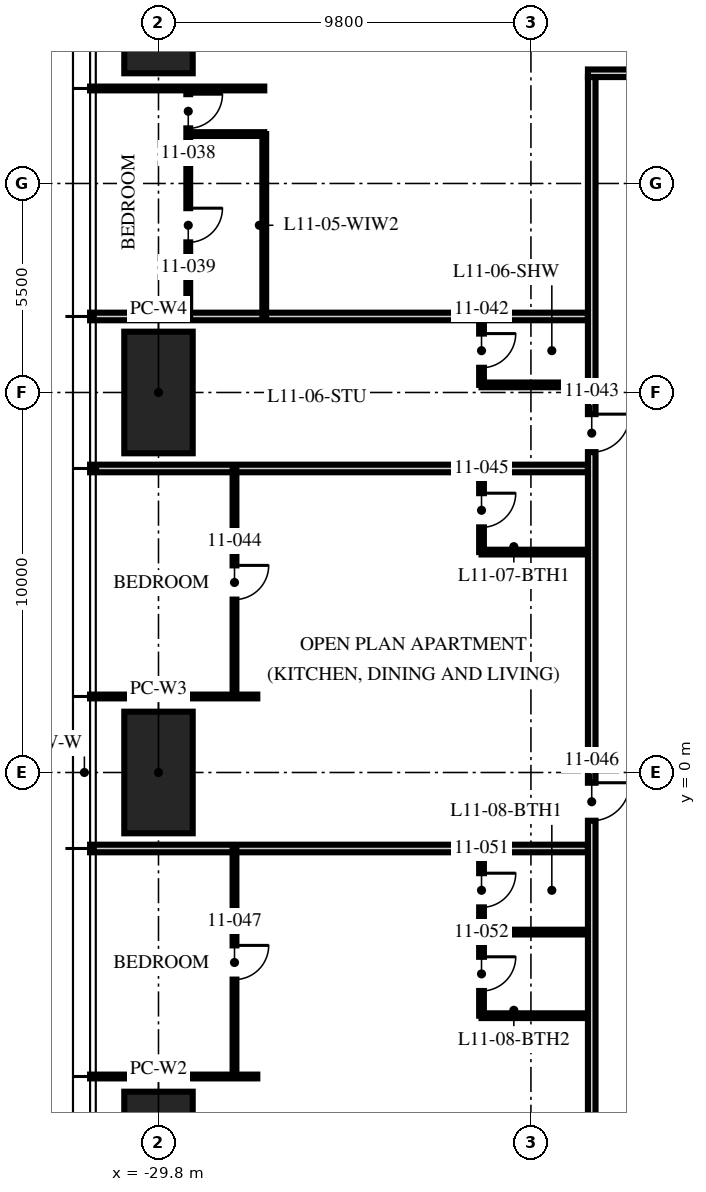
"""IFC4 building model, lengths in metres.
Left out: names, types, materials, properties, quantities, classifications, styles, units other than length and angle.
Written with IfcOpenShell. Run it as: python <this file> out.ifc"""

import sys

from ifc_helpers import new_model, si_unit, direction, frame, frame_2d, origin, origin_2d, place, context, subcontext, project, spatial, rectangle, hollow_rectangle, extrude, element, fill, save


model = new_model("IFC4")
c1 = context("Model", 3, precision=1e-05, world=origin(), true_north=direction((0.0, 1.0)))
c2 = subcontext(c1, "Body", "Model", "MODEL_VIEW")
j1 = project(units=[si_unit("LENGTHUNIT", "METRE"), si_unit("PLANEANGLEUNIT", "RADIAN")], contexts=[c1])
p1 = place(None, origin())
s1 = spatial("IfcSite", under=j1, at=p1, CompositionType="ELEMENT")
p2 = place(p1, origin())
s2 = spatial("IfcBuilding", under=s1, at=p2, CompositionType="ELEMENT")
p3 = place(p2, frame((0.0, 0.0, 47.25)))
s3 = spatial("IfcBuildingStorey", under=s2, at=p3, CompositionType="ELEMENT", Elevation=47.25)
for number, where, z_axis, x_axis in (
    (1, (-29.8, -10.0, 0.0), (0.0, 0.0, 1.0), (0.0, 1.0, 0.0)),
    (2, (-29.8, 0.0, 0.0), (0.0, 0.0, 1.0), (0.0, 1.0, 0.0)),
    (3, (-29.8, 10.0, 0.0), (0.0, 0.0, 1.0), (0.0, 1.0, 0.0)),
    (4, (-29.8, 20.0, 0.0), (0.0, 0.0, 1.0), (0.0, 1.0, 0.0)),
):
    element("IfcColumn", number, at=place(p3, frame(where, z_axis=z_axis, x_axis=x_axis)), inside=s3, PredefinedType="COLUMN", context=c2, shape_type="SweptSolid", body=[
        extrude(hollow_rectangle(XDim=3.2, YDim=1.8, WallThickness=0.2, at=origin_2d()), origin(), (0.0, 0.0, 1.0), 3.75),
    ])
p4 = place(p3, frame((-27.017, 18.0, 0.0), z_axis=(0.0, 0.0, 1.0), x_axis=(-1.0, 0.0, 0.0)))
e5 = element("IfcWall", 5, at=p4, inside=s3, PredefinedType="PARTITIONING", context=c2, shape_type="SweptSolid", body=[
    extrude(rectangle(XDim=4.583, YDim=0.1, at=frame_2d((2.292, 0.0))), origin(), (0.0, 0.0, 1.0), 2.71),
])
for number, where, z_axis, x_axis in (
    (6, (-18.5, 12.0, 0.0), (0.0, 0.0, 1.0), (-1.0, 0.0, 0.0)),
    (7, (-18.5, 8.0, 0.0), (0.0, 0.0, 1.0), (-1.0, 0.0, 0.0)),
):
    element("IfcWall", number, at=place(p3, frame(where, z_axis=z_axis, x_axis=x_axis)), inside=s3, PredefinedType="PARTITIONING", context=c2, shape_type="SweptSolid", body=[
        extrude(rectangle(XDim=13.1, YDim=0.2, at=frame_2d((6.55, 0.0))), origin(), (0.0, 0.0, 1.0), 2.71),
    ])
p5 = place(p3, frame((-27.2, 2.0, 0.0), z_axis=(0.0, 0.0, 1.0), x_axis=(-1.0, 0.0, 0.0)))
e8 = element("IfcWall", 8, at=p5, inside=s3, PredefinedType="PARTITIONING", context=c2, shape_type="SweptSolid", body=[
    extrude(rectangle(XDim=4.4, YDim=0.1, at=frame_2d((2.2, 0.0))), origin(), (0.0, 0.0, 1.0), 2.71),
])
p6 = place(p3, frame((-18.5, -2.0, 0.0), z_axis=(0.0, 0.0, 1.0), x_axis=(-1.0, 0.0, 0.0)))
e9 = element("IfcWall", 9, at=p6, inside=s3, PredefinedType="PARTITIONING", context=c2, shape_type="SweptSolid", body=[
    extrude(rectangle(XDim=13.1, YDim=0.2, at=frame_2d((6.55, 0.0))), origin(), (0.0, 0.0, 1.0), 2.71),
])
p7 = place(p3, frame((-27.2, -8.0, 0.0), z_axis=(0.0, 0.0, 1.0), x_axis=(-1.0, 0.0, 0.0)))
e10 = element("IfcWall", 10, at=p7, inside=s3, PredefinedType="PARTITIONING", context=c2, shape_type="SweptSolid", body=[
    extrude(rectangle(XDim=4.4, YDim=0.1, at=frame_2d((2.2, 0.0))), origin(), (0.0, 0.0, 1.0), 2.71),
])
p8 = place(p3, frame((-29.017, 18.0, 0.0), z_axis=(0.0, 0.0, 1.0), x_axis=(0.0, -1.0, 0.0)))
e11 = element("IfcWall", 11, at=p8, inside=s3, PredefinedType="PARTITIONING", context=c2, shape_type="SweptSolid", body=[
    extrude(rectangle(XDim=6.0, YDim=0.1, at=frame_2d((3.0, 0.0))), origin(), (0.0, 0.0, 1.0), 2.61),
])
p9 = place(p8, frame((0.15, 0.0, 0.0)))
e12 = element("IfcOpeningElement", 12, at=p9, cuts=e11, PredefinedType="OPENING", context=c2, shape_type="SweptSolid", body=[
    extrude(rectangle(XDim=0.9, YDim=2.1, at=frame_2d((0.45, 1.05))), frame((0.0, 0.06, 0.0), z_axis=(0.0, -1.0, 0.0), x_axis=(1.0, 0.0, 0.0)), (0.0, 0.0, 1.0), 0.12),
])
p10 = place(p8, frame((3.15, 0.0, 0.0)))
e13 = element("IfcOpeningElement", 13, at=p10, cuts=e11, PredefinedType="OPENING", context=c2, shape_type="SweptSolid", body=[
    extrude(rectangle(XDim=0.9, YDim=2.1, at=frame_2d((0.45, 1.05))), frame((0.0, 0.06, 0.0), z_axis=(0.0, -1.0, 0.0), x_axis=(1.0, 0.0, 0.0)), (0.0, 0.0, 1.0), 0.12),
])
p11 = place(p3, frame((-27.017, 16.8, 0.0), z_axis=(0.0, 0.0, 1.0), x_axis=(-1.0, 0.0, 0.0)))
e14 = element("IfcWall", 14, at=p11, inside=s3, PredefinedType="PARTITIONING", context=c2, shape_type="SweptSolid", body=[
    extrude(rectangle(XDim=2.0, YDim=0.1, at=frame_2d((1.0, 0.0))), origin(), (0.0, 0.0, 1.0), 3.5),
])
p12 = place(p3, frame((-27.017, 16.8, 0.0), z_axis=(0.0, 0.0, 1.0), x_axis=(0.0, -1.0, 0.0)))
e15 = element("IfcWall", 15, at=p12, inside=s3, PredefinedType="PARTITIONING", context=c2, shape_type="SweptSolid", body=[
    extrude(rectangle(XDim=4.8, YDim=0.1, at=frame_2d((2.4, 0.0))), origin(), (0.0, 0.0, 1.0), 2.61),
])
p13 = place(p3, frame((-21.3, 12.0, 0.0), z_axis=(0.0, 0.0, 1.0), x_axis=(0.0, -1.0, 0.0)))
e16 = element("IfcWall", 16, at=p13, inside=s3, PredefinedType="PARTITIONING", context=c2, shape_type="SweptSolid", body=[
    extrude(rectangle(XDim=1.8, YDim=0.125, at=frame_2d((0.9, 0.0))), origin(), (0.0, 0.0, 1.0), 3.5),
])
p14 = place(p13, frame((0.45, 0.0, 0.0)))
e17 = element("IfcOpeningElement", 17, at=p14, cuts=e16, PredefinedType="OPENING", context=c2, shape_type="SweptSolid", body=[
    extrude(rectangle(XDim=0.9, YDim=2.1, at=frame_2d((0.45, 1.05))), frame((0.0, 0.073, 0.0), z_axis=(0.0, -1.0, 0.0), x_axis=(1.0, 0.0, 0.0)), (0.0, 0.0, 1.0), 0.145),
])
p15 = place(p3, frame((-18.5, 10.2, 0.0), z_axis=(0.0, 0.0, 1.0), x_axis=(-1.0, 0.0, 0.0)))
e18 = element("IfcWall", 18, at=p15, inside=s3, PredefinedType="PARTITIONING", context=c2, shape_type="SweptSolid", body=[
    extrude(rectangle(XDim=2.8, YDim=0.125, at=frame_2d((1.4, 0.0))), origin(), (0.0, 0.0, 1.0), 2.492),
])
p16 = place(p3, frame((-27.8, 8.0, 0.0), z_axis=(0.0, 0.0, 1.0), x_axis=(0.0, -1.0, 0.0)))
e19 = element("IfcWall", 19, at=p16, inside=s3, PredefinedType="PARTITIONING", context=c2, shape_type="SweptSolid", body=[
    extrude(rectangle(XDim=6.0, YDim=0.1, at=frame_2d((3.0, 0.0))), origin(), (0.0, 0.0, 1.0), 2.61),
])
p17 = place(p16, frame((2.55, 0.0, 0.0)))
e20 = element("IfcOpeningElement", 20, at=p17, cuts=e19, PredefinedType="OPENING", context=c2, shape_type="SweptSolid", body=[
    extrude(rectangle(XDim=0.9, YDim=2.1, at=frame_2d((0.45, 1.05))), frame((0.0, 0.06, 0.0), z_axis=(0.0, -1.0, 0.0), x_axis=(1.0, 0.0, 0.0)), (0.0, 0.0, 1.0), 0.12),
])
p18 = place(p3, frame((-21.3, 8.0, 0.0), z_axis=(0.0, 0.0, 1.0), x_axis=(0.0, -1.0, 0.0)))
e21 = element("IfcWall", 21, at=p18, inside=s3, PredefinedType="PARTITIONING", context=c2, shape_type="SweptSolid", body=[
    extrude(rectangle(XDim=2.2, YDim=0.125, at=frame_2d((1.1, 0.0))), origin(), (0.0, 0.0, 1.0), 3.5),
])
p19 = place(p18, frame((0.65, 0.0, 0.0)))
e22 = element("IfcOpeningElement", 22, at=p19, cuts=e21, PredefinedType="OPENING", context=c2, shape_type="SweptSolid", body=[
    extrude(rectangle(XDim=0.9, YDim=2.1, at=frame_2d((0.45, 1.05))), frame((0.0, 0.073, 0.0), z_axis=(0.0, -1.0, 0.0), x_axis=(1.0, 0.0, 0.0)), (0.0, 0.0, 1.0), 0.145),
])
p20 = place(p3, frame((-18.5, 5.8, 0.0), z_axis=(0.0, 0.0, 1.0), x_axis=(-1.0, 0.0, 0.0)))
e23 = element("IfcWall", 23, at=p20, inside=s3, PredefinedType="PARTITIONING", context=c2, shape_type="SweptSolid", body=[
    extrude(rectangle(XDim=2.8, YDim=0.125, at=frame_2d((1.4, 0.0))), origin(), (0.0, 0.0, 1.0), 3.5),
])
p21 = place(p3, frame((-27.8, -2.0, 0.0), z_axis=(0.0, 0.0, 1.0), x_axis=(0.0, -1.0, 0.0)))
e24 = element("IfcWall", 24, at=p21, inside=s3, PredefinedType="PARTITIONING", context=c2, shape_type="SweptSolid", body=[
    extrude(rectangle(XDim=6.0, YDim=0.1, at=frame_2d((3.0, 0.0))), origin(), (0.0, 0.0, 1.0), 2.61),
])
p22 = place(p21, frame((2.55, 0.0, 0.0)))
e25 = element("IfcOpeningElement", 25, at=p22, cuts=e24, PredefinedType="OPENING", context=c2, shape_type="SweptSolid", body=[
    extrude(rectangle(XDim=0.9, YDim=2.1, at=frame_2d((0.45, 1.05))), frame((0.0, 0.06, 0.0), z_axis=(0.0, -1.0, 0.0), x_axis=(1.0, 0.0, 0.0)), (0.0, 0.0, 1.0), 0.12),
])
p23 = place(p3, frame((-21.3, -2.0, 0.0), z_axis=(0.0, 0.0, 1.0), x_axis=(0.0, -1.0, 0.0)))
e26 = element("IfcWall", 26, at=p23, inside=s3, PredefinedType="PARTITIONING", context=c2, shape_type="SweptSolid", body=[
    extrude(rectangle(XDim=4.4, YDim=0.125, at=frame_2d((2.2, 0.0))), origin(), (0.0, 0.0, 1.0), 2.61),
])
p24 = place(p23, frame((0.65, 0.0, 0.0)))
e27 = element("IfcOpeningElement", 27, at=p24, cuts=e26, PredefinedType="OPENING", context=c2, shape_type="SweptSolid", body=[
    extrude(rectangle(XDim=0.9, YDim=2.1, at=frame_2d((0.45, 1.05))), frame((0.0, 0.073, 0.0), z_axis=(0.0, -1.0, 0.0), x_axis=(1.0, 0.0, 0.0)), (0.0, 0.0, 1.0), 0.145),
])
p25 = place(p23, frame((2.85, 0.0, 0.0)))
e28 = element("IfcOpeningElement", 28, at=p25, cuts=e26, PredefinedType="OPENING", context=c2, shape_type="SweptSolid", body=[
    extrude(rectangle(XDim=0.9, YDim=2.1, at=frame_2d((0.45, 1.05))), frame((0.0, 0.073, 0.0), z_axis=(0.0, -1.0, 0.0), x_axis=(1.0, 0.0, 0.0)), (0.0, 0.0, 1.0), 0.145),
])
for number, where, z_axis, x_axis in (
    (29, (-18.5, -4.2, 0.0), (0.0, 0.0, 1.0), (-1.0, 0.0, 0.0)),
    (30, (-18.5, -6.4, 0.0), (0.0, 0.0, 1.0), (-1.0, 0.0, 0.0)),
):
    element("IfcWall", number, at=place(p3, frame(where, z_axis=z_axis, x_axis=x_axis)), inside=s3, PredefinedType="PARTITIONING", context=c2, shape_type="SweptSolid", body=[
        extrude(rectangle(XDim=2.8, YDim=0.125, at=frame_2d((1.4, 0.0))), origin(), (0.0, 0.0, 1.0), 3.5),
    ])
p26 = place(p3, frame((-18.5, 18.4, 0.0), z_axis=(0.0, 0.0, 1.0), x_axis=(1.0, 0.0, 0.0)))
e31 = element("IfcWall", 31, at=p26, inside=s3, PredefinedType="PARTITIONING", context=c2, shape_type="SweptSolid", body=[
    extrude(rectangle(XDim=14.5, YDim=0.2, at=frame_2d((7.25, 0.0))), origin(), (0.0, 0.0, 1.0), 2.3),
])
p27 = place(p3, frame((-18.4, 18.3, 0.0), z_axis=(0.0, 0.0, 1.0), x_axis=(0.0, -1.0, 0.0)))
e32 = element("IfcWall", 32, at=p27, inside=s3, PredefinedType="PARTITIONING", context=c2, shape_type="SweptSolid", body=[
    extrude(rectangle(XDim=36.6, YDim=0.2, at=frame_2d((18.3, 0.0))), origin(), (0.0, 0.0, 1.0), 2.3),
])
p28 = place(p27, frame((8.87, 0.0, 0.0)))
e33 = element("IfcOpeningElement", 33, at=p28, cuts=e32, PredefinedType="OPENING", context=c2, shape_type="SweptSolid", body=[
    extrude(rectangle(XDim=1.0, YDim=2.2, at=frame_2d((0.5, 1.1))), frame((0.0, 0.11, 0.0), z_axis=(0.0, -1.0, 0.0), x_axis=(1.0, 0.0, 0.0)), (0.0, 0.0, 1.0), 0.22),
])
p29 = place(p27, frame((18.57, 0.0, 0.0)))
e34 = element("IfcOpeningElement", 34, at=p29, cuts=e32, PredefinedType="OPENING", context=c2, shape_type="SweptSolid", body=[
    extrude(rectangle(XDim=1.0, YDim=2.2, at=frame_2d((0.5, 1.1))), frame((0.0, 0.11, 0.0), z_axis=(0.0, -1.0, 0.0), x_axis=(1.0, 0.0, 0.0)), (0.0, 0.0, 1.0), 0.22),
])
p30 = place(p27, frame((34.82, 0.0, 0.0)))
e35 = element("IfcOpeningElement", 35, at=p30, cuts=e32, PredefinedType="OPENING", context=c2, shape_type="SweptSolid", body=[
    extrude(rectangle(XDim=1.0, YDim=2.2, at=frame_2d((0.5, 1.1))), frame((0.0, 0.11, 0.0), z_axis=(0.0, -1.0, 0.0), x_axis=(1.0, 0.0, 0.0)), (0.0, 0.0, 1.0), 0.22),
])
p31 = place(p9, origin())
e36 = element("IfcDoor", 36, at=p31, inside=s3, OperationType="SINGLE_SWING_LEFT", PredefinedType="DOOR", context=c2, shape_type="SweptSolid", body=[
    extrude(rectangle(XDim=0.9, YDim=2.1, at=frame_2d((0.45, 1.05))), frame((0.0, 0.025, 0.0), z_axis=(0.0, -1.0, 0.0), x_axis=(1.0, 0.0, 0.0)), (0.0, 0.0, 1.0), 0.05),
])
fill(e12, e36)
p32 = place(p10, origin())
e37 = element("IfcDoor", 37, at=p32, inside=s3, OperationType="SINGLE_SWING_LEFT", PredefinedType="DOOR", context=c2, shape_type="SweptSolid", body=[
    extrude(rectangle(XDim=0.9, YDim=2.1, at=frame_2d((0.45, 1.05))), frame((0.0, 0.025, 0.0), z_axis=(0.0, -1.0, 0.0), x_axis=(1.0, 0.0, 0.0)), (0.0, 0.0, 1.0), 0.05),
])
fill(e13, e37)
p33 = place(p14, origin())
e38 = element("IfcDoor", 38, at=p33, inside=s3, OperationType="SINGLE_SWING_LEFT", PredefinedType="DOOR", context=c2, shape_type="SweptSolid", body=[
    extrude(rectangle(XDim=0.9, YDim=2.1, at=frame_2d((0.45, 1.05))), frame((0.0, 0.025, 0.0), z_axis=(0.0, -1.0, 0.0), x_axis=(1.0, 0.0, 0.0)), (0.0, 0.0, 1.0), 0.05),
])
fill(e17, e38)
p34 = place(p28, origin())
e39 = element("IfcDoor", 39, at=p34, inside=s3, OperationType="SINGLE_SWING_LEFT", PredefinedType="DOOR", context=c2, shape_type="SweptSolid", body=[
    extrude(rectangle(XDim=1.0, YDim=2.2, at=frame_2d((0.5, 1.1))), frame((0.0, 0.025, 0.0), z_axis=(0.0, -1.0, 0.0), x_axis=(1.0, 0.0, 0.0)), (0.0, 0.0, 1.0), 0.05),
])
fill(e33, e39)
p35 = place(p17, origin())
e40 = element("IfcDoor", 40, at=p35, inside=s3, OperationType="SINGLE_SWING_LEFT", PredefinedType="DOOR", context=c2, shape_type="SweptSolid", body=[
    extrude(rectangle(XDim=0.9, YDim=2.1, at=frame_2d((0.45, 1.05))), frame((0.0, 0.025, 0.0), z_axis=(0.0, -1.0, 0.0), x_axis=(1.0, 0.0, 0.0)), (0.0, 0.0, 1.0), 0.05),
])
fill(e20, e40)
p36 = place(p19, origin())
e41 = element("IfcDoor", 41, at=p36, inside=s3, OperationType="SINGLE_SWING_LEFT", PredefinedType="DOOR", context=c2, shape_type="SweptSolid", body=[
    extrude(rectangle(XDim=0.9, YDim=2.1, at=frame_2d((0.45, 1.05))), frame((0.0, 0.025, 0.0), z_axis=(0.0, -1.0, 0.0), x_axis=(1.0, 0.0, 0.0)), (0.0, 0.0, 1.0), 0.05),
])
fill(e22, e41)
p37 = place(p29, origin())
e42 = element("IfcDoor", 42, at=p37, inside=s3, OperationType="SINGLE_SWING_LEFT", PredefinedType="DOOR", context=c2, shape_type="SweptSolid", body=[
    extrude(rectangle(XDim=1.0, YDim=2.2, at=frame_2d((0.5, 1.1))), frame((0.0, 0.025, 0.0), z_axis=(0.0, -1.0, 0.0), x_axis=(1.0, 0.0, 0.0)), (0.0, 0.0, 1.0), 0.05),
])
fill(e34, e42)
p38 = place(p22, origin())
e43 = element("IfcDoor", 43, at=p38, inside=s3, OperationType="SINGLE_SWING_LEFT", PredefinedType="DOOR", context=c2, shape_type="SweptSolid", body=[
    extrude(rectangle(XDim=0.9, YDim=2.1, at=frame_2d((0.45, 1.05))), frame((0.0, 0.025, 0.0), z_axis=(0.0, -1.0, 0.0), x_axis=(1.0, 0.0, 0.0)), (0.0, 0.0, 1.0), 0.05),
])
fill(e25, e43)
p39 = place(p24, origin())
e44 = element("IfcDoor", 44, at=p39, inside=s3, OperationType="SINGLE_SWING_LEFT", PredefinedType="DOOR", context=c2, shape_type="SweptSolid", body=[
    extrude(rectangle(XDim=0.9, YDim=2.1, at=frame_2d((0.45, 1.05))), frame((0.0, 0.025, 0.0), z_axis=(0.0, -1.0, 0.0), x_axis=(1.0, 0.0, 0.0)), (0.0, 0.0, 1.0), 0.05),
])
fill(e27, e44)
p40 = place(p25, origin())
e45 = element("IfcDoor", 45, at=p40, inside=s3, OperationType="SINGLE_SWING_LEFT", PredefinedType="DOOR", context=c2, shape_type="SweptSolid", body=[
    extrude(rectangle(XDim=0.9, YDim=2.1, at=frame_2d((0.45, 1.05))), frame((0.0, 0.025, 0.0), z_axis=(0.0, -1.0, 0.0), x_axis=(1.0, 0.0, 0.0)), (0.0, 0.0, 1.0), 0.05),
])
fill(e28, e45)
save(model, sys.argv[1])
